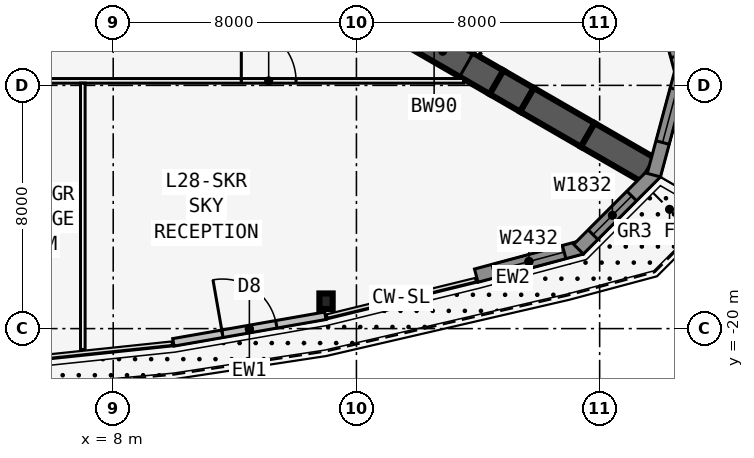
"""IFC4 building model, lengths in metres.
Left out: names, types, materials, properties, quantities, classifications, styles, units other than length and angle.
Written with IfcOpenShell. Run it as: python <this file> out.ifc"""

import sys

from ifc_helpers import new_model, si_unit, direction, frame, frame_2d, origin, origin_2d, place, context, subcontext, project, spatial, polyline, rectangle, i_section, outline, extrude, element, fill, save


model = new_model("IFC4")
c1 = context("Model", 3, precision=1e-05, world=origin(), true_north=direction((0.0, 1.0)))
c2 = subcontext(c1, "Body", "Model", "MODEL_VIEW")
j1 = project(units=[si_unit("LENGTHUNIT", "METRE"), si_unit("PLANEANGLEUNIT", "RADIAN")], contexts=[c1])
p1 = place(None, origin())
s1 = spatial("IfcSite", under=j1, at=p1, CompositionType="ELEMENT")
p2 = place(p1, origin())
s2 = spatial("IfcBuilding", under=s1, at=p2, CompositionType="ELEMENT")
p3 = place(p2, frame((0.0, 0.0, 109.7)))
s3 = spatial("IfcBuildingStorey", under=s2, at=p3, CompositionType="ELEMENT", Elevation=109.7)
p4 = place(p3, frame((16.5, -9.526, 0.0), z_axis=(0.0, 0.0, 1.0), x_axis=(0.866031398331, -0.499989616998, 0.0)))
e1 = element("IfcWall", 1, at=p4, inside=s3, PredefinedType="SHEAR", context=c2, shape_type="SweptSolid", body=[
    extrude(rectangle(XDim=4.746, YDim=0.9, at=frame_2d((2.373, 0.0))), origin(), (0.0, 0.0, 1.0), 5.0),
])
p5 = place(p4, frame((1.8, 0.0, 0.0)))
e2 = element("IfcOpeningElement", 2, at=p5, cuts=e1, PredefinedType="OPENING", context=c2, shape_type="SweptSolid", body=[
    extrude(rectangle(XDim=1.8, YDim=2.13, at=frame_2d((0.9, 1.065))), frame((0.0, 0.46, 0.0), z_axis=(0.0, -1.0, 0.0), x_axis=(1.0, 0.0, 0.0)), (0.0, 0.0, 1.0), 0.92),
])
p6 = place(p3, frame((20.61, -11.899, 0.0), z_axis=(0.0, 0.0, 1.0), x_axis=(0.866009537788, -0.500027479704, 0.0)))
e3 = element("IfcWall", 3, at=p6, inside=s3, PredefinedType="SHEAR", context=c2, shape_type="SweptSolid", body=[
    extrude(rectangle(XDim=1.155, YDim=0.9, at=frame_2d((0.577, 0.0))), origin(), (0.0, 0.0, 1.0), 5.0),
])
for number, where, z_axis, x_axis in (
    (4, (21.61, -12.477, 0.0), (0.0, 0.0, 1.0), (0.866, -0.5, 0.0)),
    (5, (23.61, -13.631, 0.0), (0.0, 0.0, 1.0), (0.866, -0.5, 0.0)),
):
    element("IfcWall", number, at=place(p3, frame(where, z_axis=z_axis, x_axis=x_axis)), inside=s3, PredefinedType="SHEAR", context=c2, shape_type="SweptSolid", body=[
        extrude(rectangle(XDim=2.309, YDim=0.9, at=frame_2d((1.155, 0.0))), origin(), (0.0, 0.0, 1.0), 5.0),
    ])
p7 = place(p3, frame((15.0, -19.1, 0.0), z_axis=(0.0, 0.0, 1.0), x_axis=(1.0, 0.0, 0.0)))
e6 = element("IfcColumn", 6, at=p7, inside=s3, PredefinedType="COLUMN", context=c2, shape_type="SweptSolid", body=[
    extrude(i_section(OverallWidth=0.437, OverallDepth=0.513, WebThickness=0.061, FlangeThickness=0.097, at=origin_2d()), origin(), (0.0, 0.0, 1.0), 5.0),
])
p8 = place(p3, frame((9.979, -20.452, 0.0), z_axis=(0.0, 0.0, 1.0), x_axis=(0.985030467156, 0.172380331752, 0.0)))
e7 = element("IfcWall", 7, at=p8, inside=s3, PredefinedType="STANDARD", context=c2, shape_type="SweptSolid", body=[
    extrude(rectangle(XDim=5.076, YDim=0.25, at=frame_2d((2.538, 0.0))), origin(), (0.0, 0.0, 1.0), 4.835),
])
p9 = place(p8, frame((1.638, 0.0, 0.0)))
e8 = element("IfcOpeningElement", 8, at=p9, cuts=e7, PredefinedType="OPENING", context=c2, shape_type="SweptSolid", body=[
    extrude(rectangle(XDim=1.8, YDim=2.4, at=frame_2d((0.9, 1.2))), frame((0.0, 0.135, 0.0), z_axis=(0.0, -1.0, 0.0), x_axis=(1.0, 0.0, 0.0)), (0.0, 0.0, 1.0), 0.27),
])
p10 = place(p3, frame((19.942, -18.258, 0.0), z_axis=(0.0, 0.0, 1.0), x_axis=(0.965924653531, 0.258823421857, 0.0)))
e9 = element("IfcWall", 9, at=p10, inside=s3, PredefinedType="SOLIDWALL", context=c2, shape_type="SweptSolid", body=[
    extrude(rectangle(XDim=3.586, YDim=0.45, at=frame_2d((1.793, 0.0))), origin(), (0.0, 0.0, 1.0), 4.835),
])
p11 = place(p10, frame((0.593, 0.0, 0.6)))
e10 = element("IfcOpeningElement", 10, at=p11, cuts=e9, PredefinedType="OPENING", context=c2, shape_type="SweptSolid", body=[
    extrude(rectangle(XDim=2.4, YDim=3.2, at=frame_2d((1.2, 1.6))), frame((0.0, 0.235, 0.0), z_axis=(0.0, -1.0, 0.0), x_axis=(1.0, 0.0, 0.0)), (0.0, 0.0, 1.0), 0.47),
])
p12 = place(p3, frame((23.305, -17.388, 0.0), z_axis=(0.0, 0.0, 1.0), x_axis=(0.707106781187, 0.707106781187, 0.0)))
e11 = element("IfcWall", 11, at=p12, inside=s3, PredefinedType="SOLIDWALL", context=c2, shape_type="SweptSolid", body=[
    extrude(outline(polyline([(3.586, 0.225), (3.527, 0.225), (3.035, 0.093), (3.0, 0.225), (0.0, 0.225), (0.0, -0.225), (3.586, -0.225), (3.586, 0.225)])), origin(), (0.0, 0.0, 1.0), 4.835),
])
p13 = place(p12, frame((0.675, 0.0, 0.6)))
e12 = element("IfcOpeningElement", 12, at=p13, cuts=e11, PredefinedType="OPENING", context=c2, shape_type="SweptSolid", body=[
    extrude(rectangle(XDim=1.8, YDim=3.2, at=frame_2d((0.9, 1.6))), frame((0.0, 0.235, 0.0), z_axis=(0.0, -1.0, 0.0), x_axis=(1.0, 0.0, 0.0)), (0.0, 0.0, 1.0), 0.47),
])
p14 = place(p3, frame((25.783, -14.953, 0.0), z_axis=(0.0, 0.0, 1.0), x_axis=(0.258823421857, 0.965924653531, 0.0)))
e13 = element("IfcWall", 13, at=p14, inside=s3, PredefinedType="SOLIDWALL", context=c2, shape_type="SweptSolid", body=[
    extrude(outline(polyline([(3.586, 0.225), (0.586, 0.225), (0.551, 0.093), (0.06, 0.225), (0.0, 0.225), (0.0, -0.225), (3.586, -0.225), (3.586, 0.225)])), origin(), (0.0, 0.0, 1.0), 4.835),
])
p15 = place(p14, frame((1.111, 0.0, 0.6)))
e14 = element("IfcOpeningElement", 14, at=p15, cuts=e13, PredefinedType="OPENING", context=c2, shape_type="SweptSolid", body=[
    extrude(rectangle(XDim=1.8, YDim=3.2, at=frame_2d((0.9, 1.6))), frame((0.0, 0.235, 0.0), z_axis=(0.0, -1.0, 0.0), x_axis=(1.0, 0.0, 0.0)), (0.0, 0.0, 1.0), 0.47),
])
p16 = place(p3, frame((26.711, -11.605, 0.0), z_axis=(0.0, 0.0, 1.0), x_axis=(-0.258823421857, 0.965924653531, 0.0)))
e15 = element("IfcWall", 15, at=p16, inside=s3, PredefinedType="SOLIDWALL", context=c2, shape_type="SweptSolid", body=[
    extrude(rectangle(XDim=3.586, YDim=0.45, at=frame_2d((1.793, 0.0))), origin(), (0.0, 0.0, 1.0), 4.835),
])
p17 = place(p16, frame((0.593, 0.0, 0.6)))
e16 = element("IfcOpeningElement", 16, at=p17, cuts=e15, PredefinedType="OPENING", context=c2, shape_type="SweptSolid", body=[
    extrude(rectangle(XDim=2.4, YDim=3.2, at=frame_2d((1.2, 1.6))), frame((0.0, 0.235, 0.0), z_axis=(0.0, -1.0, 0.0), x_axis=(1.0, 0.0, 0.0)), (0.0, 0.0, 1.0), 0.47),
])
p18 = place(p3, frame((-19.527, -11.851, 0.0), z_axis=(0.0, 0.0, 1.0), x_axis=(1.0, 0.0, 0.0)))
e17 = element("IfcWall", 17, at=p18, inside=s3, PredefinedType="PARTITIONING", context=c2, shape_type="SweptSolid", body=[
    extrude(rectangle(XDim=39.054, YDim=0.15, at=frame_2d((19.527, 0.0))), origin(), (0.0, 0.0, 1.0), 4.835),
])
p19 = place(p18, frame((10.513, 0.0, 0.0)))
e18 = element("IfcOpeningElement", 18, at=p19, cuts=e17, PredefinedType="OPENING", context=c2, shape_type="SweptSolid", body=[
    extrude(rectangle(XDim=1.8, YDim=2.13, at=frame_2d((0.9, 1.065))), frame((0.0, 0.085, 0.0), z_axis=(0.0, -1.0, 0.0), x_axis=(1.0, 0.0, 0.0)), (0.0, 0.0, 1.0), 0.17),
])
p20 = place(p18, frame((24.027, 0.0, 0.0)))
e19 = element("IfcOpeningElement", 19, at=p20, cuts=e17, PredefinedType="OPENING", context=c2, shape_type="SweptSolid", body=[
    extrude(rectangle(XDim=1.0, YDim=2.13, at=frame_2d((0.5, 1.065))), frame((0.0, 0.085, 0.0), z_axis=(0.0, -1.0, 0.0), x_axis=(1.0, 0.0, 0.0)), (0.0, 0.0, 1.0), 0.17),
])
p21 = place(p18, frame((31.74, 0.0, 0.0)))
e20 = element("IfcOpeningElement", 20, at=p21, cuts=e17, PredefinedType="OPENING", context=c2, shape_type="SweptSolid", body=[
    extrude(rectangle(XDim=1.8, YDim=2.13, at=frame_2d((0.9, 1.065))), frame((0.0, 0.085, 0.0), z_axis=(0.0, -1.0, 0.0), x_axis=(1.0, 0.0, 0.0)), (0.0, 0.0, 1.0), 0.17),
])
p22 = place(p3, frame((7.0, -11.926, 0.0), z_axis=(0.0, 0.0, 1.0), x_axis=(0.0, -1.0, 0.0)))
e21 = element("IfcWall", 21, at=p22, inside=s3, PredefinedType="PARTITIONING", context=c2, shape_type="SweptSolid", body=[
    extrude(rectangle(XDim=8.76, YDim=0.15, at=frame_2d((4.38, 0.0))), origin(), (0.0, 0.0, 1.0), 4.835),
])
p23 = place(p3, frame((20.027, -10.985, 0.0), z_axis=(0.0, 0.0, 1.0), x_axis=(-0.500001677587, 0.866024435227, 0.0)))
e22 = element("IfcWall", 22, at=p23, inside=s3, PredefinedType="PARTITIONING", context=c2, shape_type="SweptSolid", body=[
    extrude(rectangle(XDim=39.054, YDim=0.15, at=frame_2d((19.527, 0.0))), origin(), (0.0, 0.0, 1.0), 4.835),
])
p24 = place(p23, frame((6.513, 0.0, 0.0)))
e23 = element("IfcOpeningElement", 23, at=p24, cuts=e22, PredefinedType="OPENING", context=c2, shape_type="SweptSolid", body=[
    extrude(rectangle(XDim=1.8, YDim=2.13, at=frame_2d((0.9, 1.065))), frame((0.0, 0.085, 0.0), z_axis=(0.0, -1.0, 0.0), x_axis=(1.0, 0.0, 0.0)), (0.0, 0.0, 1.0), 0.17),
])
p25 = place(p23, frame((16.527, 0.0, 0.0)))
e24 = element("IfcOpeningElement", 24, at=p25, cuts=e22, PredefinedType="OPENING", context=c2, shape_type="SweptSolid", body=[
    extrude(rectangle(XDim=1.0, YDim=2.13, at=frame_2d((0.5, 1.065))), frame((0.0, 0.085, 0.0), z_axis=(0.0, -1.0, 0.0), x_axis=(1.0, 0.0, 0.0)), (0.0, 0.0, 1.0), 0.17),
])
p26 = place(p23, frame((21.527, 0.0, 0.0)))
e25 = element("IfcOpeningElement", 25, at=p26, cuts=e22, PredefinedType="OPENING", context=c2, shape_type="SweptSolid", body=[
    extrude(rectangle(XDim=1.0, YDim=2.13, at=frame_2d((0.5, 1.065))), frame((0.0, 0.085, 0.0), z_axis=(0.0, -1.0, 0.0), x_axis=(1.0, 0.0, 0.0)), (0.0, 0.0, 1.0), 0.17),
])
p27 = place(p23, frame((25.527, 0.0, 0.0)))
e26 = element("IfcOpeningElement", 26, at=p27, cuts=e22, PredefinedType="OPENING", context=c2, shape_type="SweptSolid", body=[
    extrude(rectangle(XDim=1.0, YDim=2.13, at=frame_2d((0.5, 1.065))), frame((0.0, 0.085, 0.0), z_axis=(0.0, -1.0, 0.0), x_axis=(1.0, 0.0, 0.0)), (0.0, 0.0, 1.0), 0.17),
])
p28 = place(p23, frame((32.24, 0.0, 0.0)))
e27 = element("IfcOpeningElement", 27, at=p28, cuts=e22, PredefinedType="OPENING", context=c2, shape_type="SweptSolid", body=[
    extrude(rectangle(XDim=1.8, YDim=2.13, at=frame_2d((0.9, 1.065))), frame((0.0, 0.085, 0.0), z_axis=(0.0, -1.0, 0.0), x_axis=(1.0, 0.0, 0.0)), (0.0, 0.0, 1.0), 0.17),
])
p29 = place(p9, origin())
e28 = element("IfcDoor", 28, at=p29, inside=s3, OperationType="DOUBLE_DOOR_SINGLE_SWING", PredefinedType="DOOR", context=c2, shape_type="SweptSolid", body=[
    extrude(rectangle(XDim=1.8, YDim=2.4, at=frame_2d((0.9, 1.2))), frame((0.0, 0.025, 0.0), z_axis=(0.0, -1.0, 0.0), x_axis=(1.0, 0.0, 0.0)), (0.0, 0.0, 1.0), 0.05),
])
fill(e8, e28)
p30 = place(p11, origin())
e29 = element("IfcWindow", 29, at=p30, inside=s3, PartitioningType="SINGLE_PANEL", PredefinedType="WINDOW", context=c2, shape_type="SweptSolid", body=[
    extrude(rectangle(XDim=2.4, YDim=3.2, at=frame_2d((1.2, 1.6))), frame((0.0, 0.03, 0.0), z_axis=(0.0, -1.0, 0.0), x_axis=(1.0, 0.0, 0.0)), (0.0, 0.0, 1.0), 0.06),
])
fill(e10, e29)
p31 = place(p13, origin())
e30 = element("IfcWindow", 30, at=p31, inside=s3, PartitioningType="SINGLE_PANEL", PredefinedType="WINDOW", context=c2, shape_type="SweptSolid", body=[
    extrude(rectangle(XDim=1.8, YDim=3.2, at=frame_2d((0.9, 1.6))), frame((0.0, 0.03, 0.0), z_axis=(0.0, -1.0, 0.0), x_axis=(1.0, 0.0, 0.0)), (0.0, 0.0, 1.0), 0.06),
])
fill(e12, e30)
p32 = place(p15, origin())
e31 = element("IfcWindow", 31, at=p32, inside=s3, PartitioningType="SINGLE_PANEL", PredefinedType="WINDOW", context=c2, shape_type="SweptSolid", body=[
    extrude(rectangle(XDim=1.8, YDim=3.2, at=frame_2d((0.9, 1.6))), frame((0.0, 0.03, 0.0), z_axis=(0.0, -1.0, 0.0), x_axis=(1.0, 0.0, 0.0)), (0.0, 0.0, 1.0), 0.06),
])
fill(e14, e31)
p33 = place(p17, origin())
e32 = element("IfcWindow", 32, at=p33, inside=s3, PartitioningType="SINGLE_PANEL", PredefinedType="WINDOW", context=c2, shape_type="SweptSolid", body=[
    extrude(rectangle(XDim=2.4, YDim=3.2, at=frame_2d((1.2, 1.6))), frame((0.0, 0.03, 0.0), z_axis=(0.0, -1.0, 0.0), x_axis=(1.0, 0.0, 0.0)), (0.0, 0.0, 1.0), 0.06),
])
fill(e16, e32)
p34 = place(p21, origin())
e33 = element("IfcDoor", 33, at=p34, inside=s3, OperationType="DOUBLE_DOOR_SINGLE_SWING", PredefinedType="DOOR", context=c2, shape_type="SweptSolid", body=[
    extrude(rectangle(XDim=1.8, YDim=2.13, at=frame_2d((0.9, 1.065))), frame((0.0, 0.025, 0.0), z_axis=(0.0, -1.0, 0.0), x_axis=(1.0, 0.0, 0.0)), (0.0, 0.0, 1.0), 0.05),
])
fill(e20, e33)
p35 = place(p5, origin())
e34 = element("IfcDoor", 34, at=p35, inside=s3, OperationType="DOUBLE_DOOR_DOUBLE_SWING", PredefinedType="DOOR", context=c2, shape_type="SweptSolid", body=[
    extrude(rectangle(XDim=1.8, YDim=2.13, at=frame_2d((0.9, 1.065))), frame((0.0, 0.025, 0.0), z_axis=(0.0, -1.0, 0.0), x_axis=(1.0, 0.0, 0.0)), (0.0, 0.0, 1.0), 0.05),
])
fill(e2, e34)
save(model, sys.argv[1])
